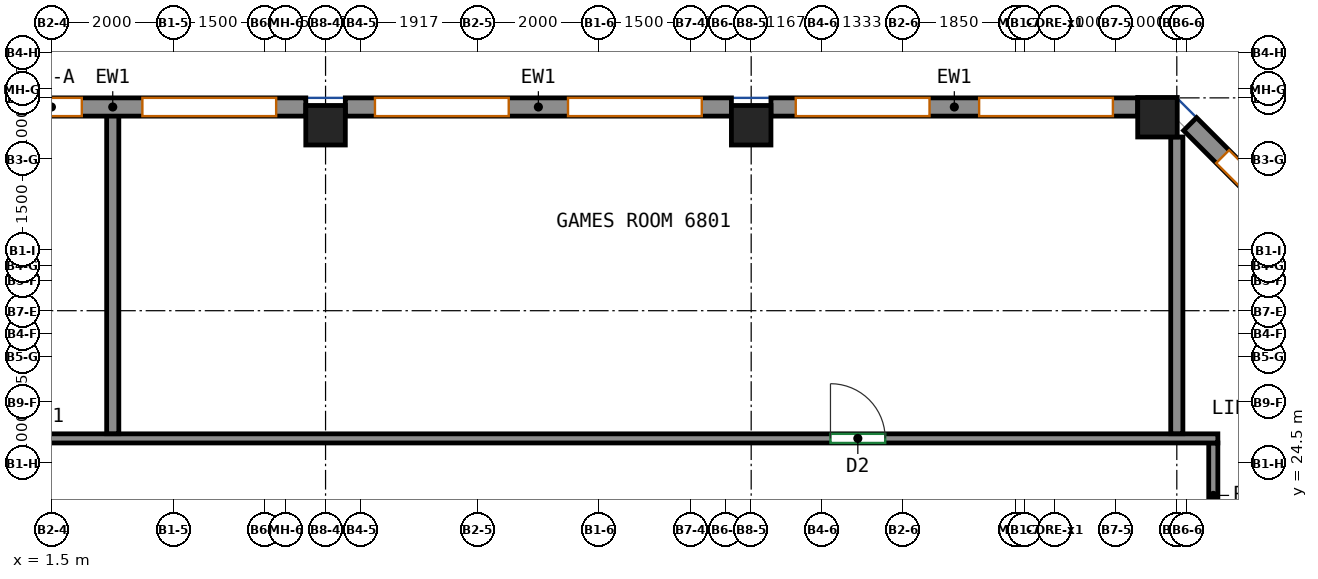
"""IFC4 building model, lengths in metres.
Left out: names, types, materials, properties, quantities, classifications, styles, units other than length and angle.
Written with IfcOpenShell. Run it as: python <this file> out.ifc"""

import sys

from ifc_helpers import new_model, si_unit, direction, frame, frame_2d, origin, origin_2d, place, context, subcontext, project, spatial, rectangle, extrude, source, transform, mapped, element, fill, save


model = new_model("IFC4")
c1 = context("Model", 3, precision=1e-05, world=origin(), true_north=direction((0.0, 1.0)))
c2 = subcontext(c1, "Body", "Model", "MODEL_VIEW")
j1 = project(units=[si_unit("LENGTHUNIT", "METRE"), si_unit("PLANEANGLEUNIT", "RADIAN")], contexts=[c1])
p1 = place(None, origin())
s1 = spatial("IfcSite", under=j1, at=p1, CompositionType="ELEMENT")
p2 = place(p1, origin())
s2 = spatial("IfcBuilding", under=s1, at=p2, CompositionType="ELEMENT")
p3 = place(p2, frame((0.0, 0.0, 277.2)))
s3 = spatial("IfcBuildingStorey", under=s2, at=p3, CompositionType="ELEMENT", Elevation=277.2)
m1 = source(origin(), c2, "Body", "SweptSolid", [
    extrude(rectangle(XDim=0.65, YDim=0.65, at=origin_2d()), origin(), (0.0, 0.0, 1.0), 3.12),
])
for number, where, z_axis, x_axis in (
    (1, (6.0, 30.05, 0.0), (0.0, 0.0, 1.0), (1.0, 0.0, 0.0)),
    (2, (13.0, 30.05, 0.0), (0.0, 0.0, 1.0), (1.0, 0.0, 0.0)),
    (3, (19.682, 30.182, 0.0), (0.0, 0.0, 1.0), (1.0, 0.0, 0.0)),
):
    element("IfcColumn", number, at=place(p3, frame(where, z_axis=z_axis, x_axis=x_axis)), inside=s3, PredefinedType="COLUMN", context=c2, shape_type="MappedRepresentation", body=[
        mapped(m1, transform((0.0, 0.0, 0.0))),
    ])
m2 = source(origin(), c2, "Body", "SweptSolid", [
    extrude(rectangle(XDim=3.712, YDim=0.3, at=frame_2d((1.856, 0.0))), origin(), (0.0, 0.0, 1.0), 3.12),
])
p4 = place(p3, frame((22.844, 27.444, 0.0), z_axis=(0.0, 0.0, 1.0), x_axis=(-0.707106781187, 0.707106781187, 0.0)))
e4 = element("IfcWall", 4, at=p4, inside=s3, PredefinedType="SOLIDWALL", context=c2, shape_type="MappedRepresentation", body=[
    mapped(m2, transform((0.0, 0.0, 0.0))),
])
p5 = place(p4, frame((0.756, 0.0, 0.8)))
e5 = element("IfcOpeningElement", 5, at=p5, cuts=e4, PredefinedType="OPENING", context=c2, shape_type="SweptSolid", body=[
    extrude(rectangle(XDim=2.2, YDim=2.05, at=frame_2d((1.1, 1.025))), frame((0.0, 0.16, 0.0), z_axis=(0.0, -1.0, 0.0), x_axis=(1.0, 0.0, 0.0)), (0.0, 0.0, 1.0), 0.32),
])
m3 = source(origin(), c2, "Body", "SweptSolid", [
    extrude(rectangle(XDim=6.032, YDim=0.3, at=frame_2d((3.016, 0.0))), origin(), (0.0, 0.0, 1.0), 3.12),
])
p6 = place(p3, frame((19.357, 30.35, 0.0), z_axis=(0.0, 0.0, 1.0), x_axis=(-1.0, 0.0, 0.0)))
e6 = element("IfcWall", 6, at=p6, inside=s3, PredefinedType="SOLIDWALL", context=c2, shape_type="MappedRepresentation", body=[
    mapped(m3, transform((0.0, 0.0, 0.0))),
])
p7 = place(p6, frame((0.408, 0.0, 0.8)))
e7 = element("IfcOpeningElement", 7, at=p7, cuts=e6, PredefinedType="OPENING", context=c2, shape_type="SweptSolid", body=[
    extrude(rectangle(XDim=2.2, YDim=2.05, at=frame_2d((1.1, 1.025))), frame((0.0, 0.16, 0.0), z_axis=(0.0, -1.0, 0.0), x_axis=(1.0, 0.0, 0.0)), (0.0, 0.0, 1.0), 0.32),
])
p8 = place(p6, frame((3.424, 0.0, 0.8)))
e8 = element("IfcOpeningElement", 8, at=p8, cuts=e6, PredefinedType="OPENING", context=c2, shape_type="SweptSolid", body=[
    extrude(rectangle(XDim=2.2, YDim=2.05, at=frame_2d((1.1, 1.025))), frame((0.0, 0.16, 0.0), z_axis=(0.0, -1.0, 0.0), x_axis=(1.0, 0.0, 0.0)), (0.0, 0.0, 1.0), 0.32),
])
m4 = source(origin(), c2, "Body", "SweptSolid", [
    extrude(rectangle(XDim=6.35, YDim=0.3, at=frame_2d((3.175, 0.0))), origin(), (0.0, 0.0, 1.0), 3.12),
])
p9 = place(p3, frame((12.675, 30.35, 0.0), z_axis=(0.0, 0.0, 1.0), x_axis=(-1.0, 0.0, 0.0)))
e9 = element("IfcWall", 9, at=p9, inside=s3, PredefinedType="SOLIDWALL", context=c2, shape_type="MappedRepresentation", body=[
    mapped(m4, transform((0.0, 0.0, 0.0))),
])
p10 = place(p9, frame((0.488, 0.0, 0.8)))
e10 = element("IfcOpeningElement", 10, at=p10, cuts=e9, PredefinedType="OPENING", context=c2, shape_type="SweptSolid", body=[
    extrude(rectangle(XDim=2.2, YDim=2.05, at=frame_2d((1.1, 1.025))), frame((0.0, 0.16, 0.0), z_axis=(0.0, -1.0, 0.0), x_axis=(1.0, 0.0, 0.0)), (0.0, 0.0, 1.0), 0.32),
])
p11 = place(p9, frame((3.663, 0.0, 0.8)))
e11 = element("IfcOpeningElement", 11, at=p11, cuts=e9, PredefinedType="OPENING", context=c2, shape_type="SweptSolid", body=[
    extrude(rectangle(XDim=2.2, YDim=2.05, at=frame_2d((1.1, 1.025))), frame((0.0, 0.16, 0.0), z_axis=(0.0, -1.0, 0.0), x_axis=(1.0, 0.0, 0.0)), (0.0, 0.0, 1.0), 0.32),
])
p12 = place(p3, frame((5.675, 30.35, 0.0), z_axis=(0.0, 0.0, 1.0), x_axis=(-1.0, 0.0, 0.0)))
e12 = element("IfcWall", 12, at=p12, inside=s3, PredefinedType="SOLIDWALL", context=c2, shape_type="MappedRepresentation", body=[
    mapped(m4, transform((0.0, 0.0, 0.0))),
])
p13 = place(p12, frame((0.488, 0.0, 0.8)))
e13 = element("IfcOpeningElement", 13, at=p13, cuts=e12, PredefinedType="OPENING", context=c2, shape_type="SweptSolid", body=[
    extrude(rectangle(XDim=2.2, YDim=2.05, at=frame_2d((1.1, 1.025))), frame((0.0, 0.16, 0.0), z_axis=(0.0, -1.0, 0.0), x_axis=(1.0, 0.0, 0.0)), (0.0, 0.0, 1.0), 0.32),
])
p14 = place(p12, frame((3.684, 0.0, 0.8)))
e14 = element("IfcOpeningElement", 14, at=p14, cuts=e12, PredefinedType="OPENING", context=c2, shape_type="SweptSolid", body=[
    extrude(rectangle(XDim=1.0, YDim=2.05, at=frame_2d((0.5, 1.025))), frame((0.0, 0.16, 0.0), z_axis=(0.0, -1.0, 0.0), x_axis=(1.0, 0.0, 0.0)), (0.0, 0.0, 1.0), 0.32),
])
p15 = place(p12, frame((5.009, 0.0, 0.8)))
e15 = element("IfcOpeningElement", 15, at=p15, cuts=e12, PredefinedType="OPENING", context=c2, shape_type="SweptSolid", body=[
    extrude(rectangle(XDim=0.85, YDim=2.05, at=frame_2d((0.425, 1.025))), frame((0.0, 0.16, 0.0), z_axis=(0.0, -1.0, 0.0), x_axis=(1.0, 0.0, 0.0)), (0.0, 0.0, 1.0), 0.32),
])
p16 = place(p3, frame((20.6, 23.1, 0.0), z_axis=(0.0, 0.0, 1.0), x_axis=(0.0, 1.0, 0.0)))
e16 = element("IfcWall", 16, at=p16, inside=s3, PredefinedType="PARTITIONING", context=c2, shape_type="SweptSolid", body=[
    extrude(rectangle(XDim=1.725, YDim=0.15, at=frame_2d((0.862, 0.0))), origin(), (0.0, 0.0, 1.0), 3.12),
])
p17 = place(p3, frame((-19.075, 24.9, 0.0), z_axis=(0.0, 0.0, 1.0), x_axis=(1.0, 0.0, 0.0)))
e17 = element("IfcWall", 17, at=p17, inside=s3, PredefinedType="PARTITIONING", context=c2, shape_type="SweptSolid", body=[
    extrude(rectangle(XDim=39.75, YDim=0.15, at=frame_2d((19.875, 0.0))), origin(), (0.0, 0.0, 1.0), 3.12),
])
p18 = place(p17, frame((11.365, 0.0, 0.0)))
e18 = element("IfcOpeningElement", 18, at=p18, cuts=e17, PredefinedType="OPENING", context=c2, shape_type="SweptSolid", body=[
    extrude(rectangle(XDim=1.0, YDim=2.1, at=frame_2d((0.5, 1.05))), frame((0.0, 0.085, 0.0), z_axis=(0.0, -1.0, 0.0), x_axis=(1.0, 0.0, 0.0)), (0.0, 0.0, 1.0), 0.17),
])
p19 = place(p17, frame((33.379, 0.0, 0.0)))
e19 = element("IfcOpeningElement", 19, at=p19, cuts=e17, PredefinedType="OPENING", context=c2, shape_type="SweptSolid", body=[
    extrude(rectangle(XDim=0.9, YDim=2.1, at=frame_2d((0.45, 1.05))), frame((0.0, 0.085, 0.0), z_axis=(0.0, -1.0, 0.0), x_axis=(1.0, 0.0, 0.0)), (0.0, 0.0, 1.0), 0.17),
])
p20 = place(p3, frame((20.0, 29.857, 0.0), z_axis=(0.0, 0.0, 1.0), x_axis=(0.0, -1.0, 0.0)))
e20 = element("IfcWall", 20, at=p20, inside=s3, PredefinedType="PARTITIONING", context=c2, shape_type="SweptSolid", body=[
    extrude(rectangle(XDim=4.88, YDim=0.2, at=frame_2d((2.44, 0.0))), origin(), (0.0, 0.0, 1.0), 3.12),
])
p21 = place(p3, frame((2.5, 30.25, 0.0), z_axis=(0.0, 0.0, 1.0), x_axis=(0.0, -1.0, 0.0)))
e21 = element("IfcWall", 21, at=p21, inside=s3, PredefinedType="PARTITIONING", context=c2, shape_type="SweptSolid", body=[
    extrude(rectangle(XDim=5.273, YDim=0.2, at=frame_2d((2.636, 0.0))), origin(), (0.0, 0.0, 1.0), 3.12),
])
p22 = place(p5, origin())
e22 = element("IfcWindow", 22, at=p22, inside=s3, PartitioningType="SINGLE_PANEL", PredefinedType="WINDOW", context=c2, shape_type="SweptSolid", body=[
    extrude(rectangle(XDim=2.2, YDim=2.05, at=frame_2d((1.1, 1.025))), frame((0.0, 0.03, 0.0), z_axis=(0.0, -1.0, 0.0), x_axis=(1.0, 0.0, 0.0)), (0.0, 0.0, 1.0), 0.06),
])
fill(e5, e22)
p23 = place(p7, origin())
e23 = element("IfcWindow", 23, at=p23, inside=s3, PartitioningType="SINGLE_PANEL", PredefinedType="WINDOW", context=c2, shape_type="SweptSolid", body=[
    extrude(rectangle(XDim=2.2, YDim=2.05, at=frame_2d((1.1, 1.025))), frame((0.0, 0.03, 0.0), z_axis=(0.0, -1.0, 0.0), x_axis=(1.0, 0.0, 0.0)), (0.0, 0.0, 1.0), 0.06),
])
fill(e7, e23)
p24 = place(p8, origin())
e24 = element("IfcWindow", 24, at=p24, inside=s3, PartitioningType="SINGLE_PANEL", PredefinedType="WINDOW", context=c2, shape_type="SweptSolid", body=[
    extrude(rectangle(XDim=2.2, YDim=2.05, at=frame_2d((1.1, 1.025))), frame((0.0, 0.03, 0.0), z_axis=(0.0, -1.0, 0.0), x_axis=(1.0, 0.0, 0.0)), (0.0, 0.0, 1.0), 0.06),
])
fill(e8, e24)
p25 = place(p10, origin())
e25 = element("IfcWindow", 25, at=p25, inside=s3, PartitioningType="SINGLE_PANEL", PredefinedType="WINDOW", context=c2, shape_type="SweptSolid", body=[
    extrude(rectangle(XDim=2.2, YDim=2.05, at=frame_2d((1.1, 1.025))), frame((0.0, 0.03, 0.0), z_axis=(0.0, -1.0, 0.0), x_axis=(1.0, 0.0, 0.0)), (0.0, 0.0, 1.0), 0.06),
])
fill(e10, e25)
p26 = place(p11, origin())
e26 = element("IfcWindow", 26, at=p26, inside=s3, PartitioningType="SINGLE_PANEL", PredefinedType="WINDOW", context=c2, shape_type="SweptSolid", body=[
    extrude(rectangle(XDim=2.2, YDim=2.05, at=frame_2d((1.1, 1.025))), frame((0.0, 0.03, 0.0), z_axis=(0.0, -1.0, 0.0), x_axis=(1.0, 0.0, 0.0)), (0.0, 0.0, 1.0), 0.06),
])
fill(e11, e26)
p27 = place(p13, origin())
e27 = element("IfcWindow", 27, at=p27, inside=s3, PartitioningType="SINGLE_PANEL", PredefinedType="WINDOW", context=c2, shape_type="SweptSolid", body=[
    extrude(rectangle(XDim=2.2, YDim=2.05, at=frame_2d((1.1, 1.025))), frame((0.0, 0.03, 0.0), z_axis=(0.0, -1.0, 0.0), x_axis=(1.0, 0.0, 0.0)), (0.0, 0.0, 1.0), 0.06),
])
fill(e13, e27)
p28 = place(p14, origin())
e28 = element("IfcWindow", 28, at=p28, inside=s3, PartitioningType="SINGLE_PANEL", PredefinedType="WINDOW", context=c2, shape_type="SweptSolid", body=[
    extrude(rectangle(XDim=1.0, YDim=2.05, at=frame_2d((0.5, 1.025))), frame((0.0, 0.03, 0.0), z_axis=(0.0, -1.0, 0.0), x_axis=(1.0, 0.0, 0.0)), (0.0, 0.0, 1.0), 0.06),
])
fill(e14, e28)
p29 = place(p19, origin())
e29 = element("IfcDoor", 29, at=p29, inside=s3, OperationType="SINGLE_SWING_LEFT", PredefinedType="DOOR", context=c2, shape_type="SweptSolid", body=[
    extrude(rectangle(XDim=0.9, YDim=2.1, at=frame_2d((0.45, 1.05))), frame((0.0, 0.025, 0.0), z_axis=(0.0, -1.0, 0.0), x_axis=(1.0, 0.0, 0.0)), (0.0, 0.0, 1.0), 0.05),
])
fill(e19, e29)
save(model, sys.argv[1])
